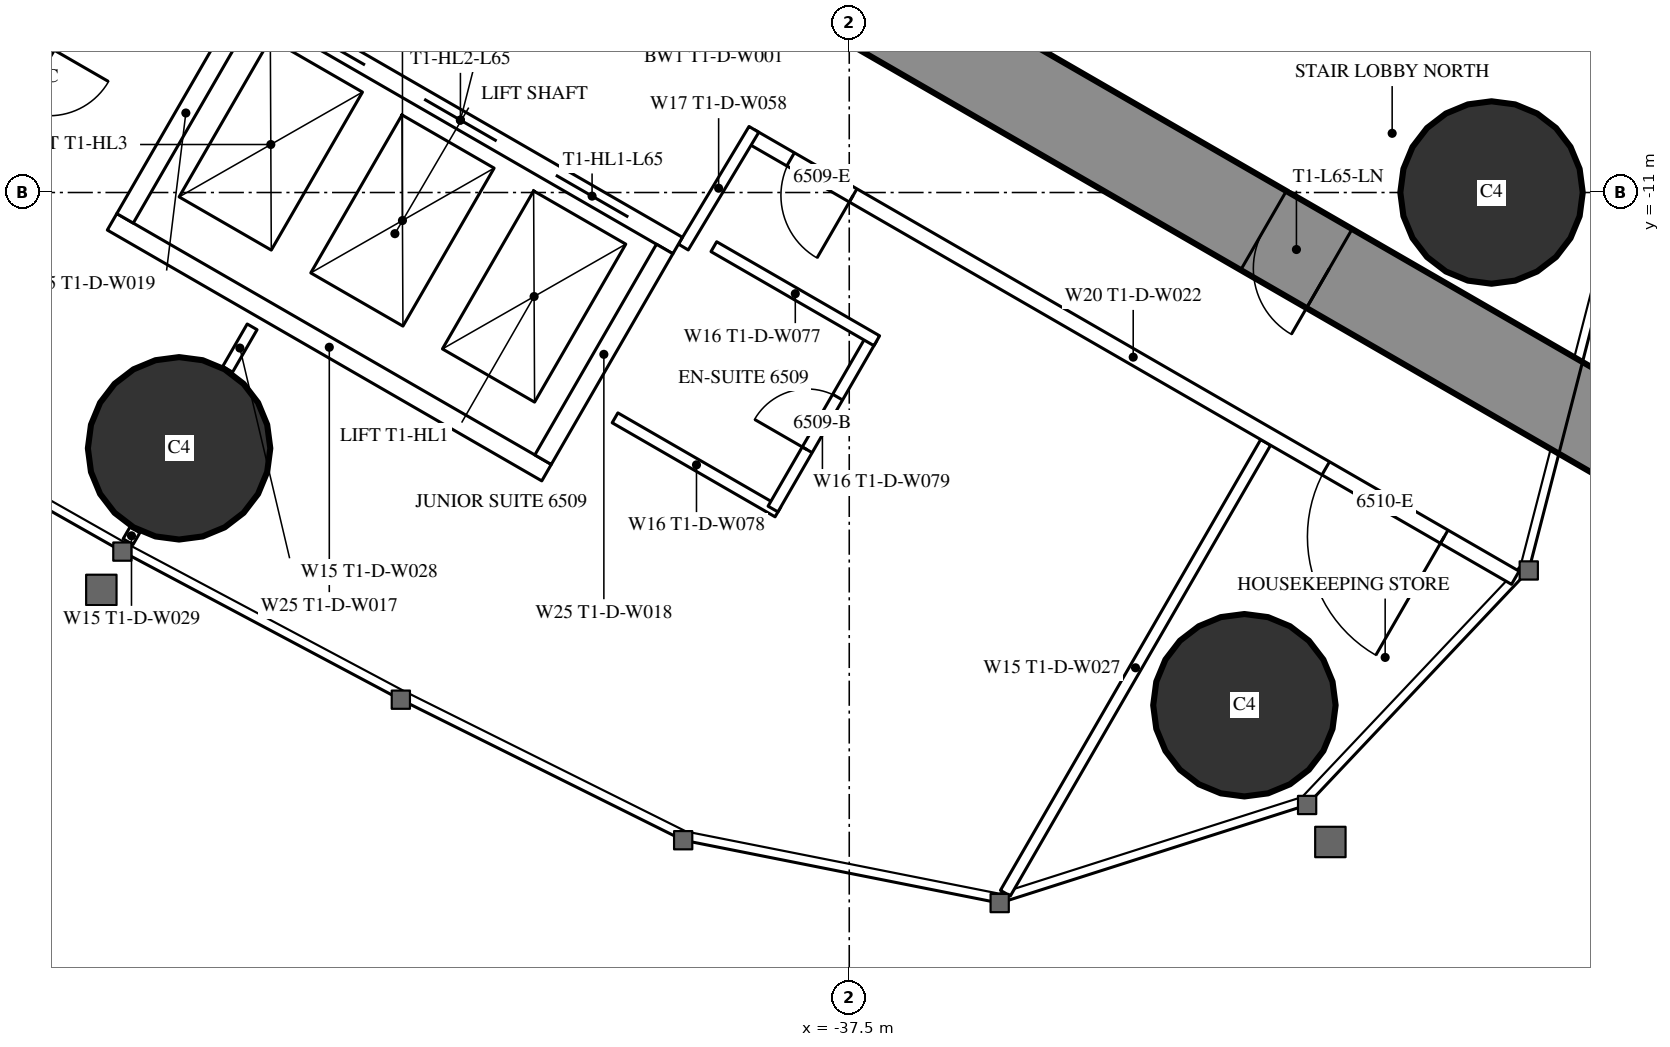
"""IFC4 building model, lengths in metres.
Left out: names, types, materials, properties, quantities, classifications, styles, units other than length and angle.
Written with IfcOpenShell. Run it as: python <this file> out.ifc"""

import sys

from ifc_helpers import new_model, si_unit, direction, frame, frame_2d, origin, origin_2d, place, context, subcontext, project, spatial, rectangle, circle, extrude, element, fill, save


model = new_model("IFC4")
c1 = context("Model", 3, precision=1e-05, world=origin(), true_north=direction((0.0, 1.0)))
c2 = subcontext(c1, "Body", "Model", "MODEL_VIEW")
j1 = project(units=[si_unit("LENGTHUNIT", "METRE"), si_unit("PLANEANGLEUNIT", "RADIAN")], contexts=[c1])
p1 = place(None, origin())
s1 = spatial("IfcSite", under=j1, at=p1, CompositionType="ELEMENT")
p2 = place(p1, origin())
s2 = spatial("IfcBuilding", under=s1, at=p2, CompositionType="ELEMENT")
p3 = place(p2, frame((0.0, 0.0, 244.1)))
s3 = spatial("IfcBuildingStorey", under=s2, at=p3, CompositionType="ELEMENT", Elevation=244.1)
for number, where, z_axis, x_axis in (
    (1, (-32.301, -17.745, 0.0), (0.0, 0.0, 1.0), (1.0, 0.0, 0.0)),
    (2, (-29.05, -11.0, 0.0), (0.0, 0.0, 1.0), (1.0, 0.0, 0.0)),
    (3, (-46.317, -14.365, 0.0), (0.0, 0.0, 1.0), (1.0, 0.0, 0.0)),
):
    element("IfcColumn", number, at=place(p3, frame(where, z_axis=z_axis, x_axis=x_axis)), inside=s3, PredefinedType="COLUMN", context=c2, shape_type="SweptSolid", body=[
        extrude(circle(Radius=1.2, at=origin_2d()), origin(), (0.0, 0.0, 1.0), 3.6),
    ])
p4 = place(p3, frame((-27.2, -14.3, 0.0), z_axis=(0.0, 0.0, 1.0), x_axis=(-0.866024021859, 0.500002393557, 0.0)))
e4 = element("IfcWall", 4, at=p4, inside=s3, PredefinedType="SHEAR", context=c2, shape_type="SweptSolid", body=[
    extrude(rectangle(XDim=27.907, YDim=1.2, at=frame_2d((13.954, 0.0))), origin(), (0.0, 0.0, 1.0), 3.6),
])
p5 = place(p4, frame((4.6, 0.0, 0.0)))
e5 = element("IfcOpeningElement", 5, at=p5, cuts=e4, PredefinedType="OPENING", context=c2, shape_type="SweptSolid", body=[
    extrude(rectangle(XDim=1.0, YDim=2.2, at=frame_2d((0.5, 1.1))), frame((0.0, 0.61, 0.0), z_axis=(0.0, -1.0, 0.0), x_axis=(1.0, 0.0, 0.0)), (0.0, 0.0, 1.0), 1.22),
])
p6 = place(p4, frame((13.395, 0.0, 0.0)))
e6 = element("IfcOpeningElement", 6, at=p6, cuts=e4, PredefinedType="OPENING", context=c2, shape_type="SweptSolid", body=[
    extrude(rectangle(XDim=1.8, YDim=2.2, at=frame_2d((0.9, 1.1))), frame((0.0, 0.61, 0.0), z_axis=(0.0, -1.0, 0.0), x_axis=(1.0, 0.0, 0.0)), (0.0, 0.0, 1.0), 1.22),
])
p7 = place(p3, frame((-32.022, -14.287, 0.0), z_axis=(0.0, 0.0, 1.0), x_axis=(-0.50000019414, -0.866025291697, 0.0)))
e7 = element("IfcWall", 7, at=p7, inside=s3, PredefinedType="PARTITIONING", context=c2, shape_type="SweptSolid", body=[
    extrude(rectangle(XDim=6.848, YDim=0.15, at=frame_2d((3.424, 0.0))), origin(), (0.0, 0.0, 1.0), 3.35),
])
p8 = place(p3, frame((-46.898, -15.439, 0.0), z_axis=(0.0, 0.0, 1.0), x_axis=(-0.500232303069, -0.865891241997, 0.0)))
e8 = element("IfcWall", 8, at=p8, inside=s3, PredefinedType="PARTITIONING", context=c2, shape_type="SweptSolid", body=[
    extrude(rectangle(XDim=0.18, YDim=0.15, at=frame_2d((0.09, 0.0))), origin(), (0.0, 0.0, 1.0), 2.45),
])
p9 = place(p3, frame((-46.274, -6.059, 0.0), z_axis=(0.0, 0.0, 1.0), x_axis=(-0.500020471368, -0.866013584312, 0.0)))
e9 = element("IfcWall", 9, at=p9, inside=s3, PredefinedType="PARTITIONING", context=c2, shape_type="SweptSolid", body=[
    extrude(rectangle(XDim=6.028, YDim=0.15, at=frame_2d((3.014, 0.0))), origin(), (0.0, 0.0, 1.0), 2.45),
])
p10 = place(p9, frame((3.5, 0.0, 0.0)))
e10 = element("IfcOpeningElement", 10, at=p10, cuts=e9, PredefinedType="OPENING", context=c2, shape_type="SweptSolid", body=[
    extrude(rectangle(XDim=0.9, YDim=2.2, at=frame_2d((0.45, 1.1))), frame((0.0, 0.085, 0.0), z_axis=(0.0, -1.0, 0.0), x_axis=(1.0, 0.0, 0.0)), (0.0, 0.0, 1.0), 0.17),
])
p11 = place(p3, frame((-45.356, -12.767, 0.0), z_axis=(0.0, 0.0, 1.0), x_axis=(-0.499886366516, -0.866091000168, 0.0)))
e11 = element("IfcWall", 11, at=p11, inside=s3, PredefinedType="PARTITIONING", context=c2, shape_type="SweptSolid", body=[
    extrude(rectangle(XDim=0.645, YDim=0.15, at=frame_2d((0.322, 0.0))), origin(), (0.0, 0.0, 1.0), 3.35),
])
p12 = place(p3, frame((-28.737, -16.068, 0.0), z_axis=(0.0, 0.0, 1.0), x_axis=(-0.866029399323, 0.49999307946, 0.0)))
e12 = element("IfcWall", 12, at=p12, inside=s3, PredefinedType="PARTITIONING", context=c2, shape_type="SweptSolid", body=[
    extrude(rectangle(XDim=11.61, YDim=0.2, at=frame_2d((5.805, 0.0))), origin(), (0.0, 0.0, 1.0), 3.35),
])
p13 = place(p12, frame((1.08, 0.0, 0.0)))
e13 = element("IfcOpeningElement", 13, at=p13, cuts=e12, PredefinedType="OPENING", context=c2, shape_type="SweptSolid", body=[
    extrude(rectangle(XDim=1.8, YDim=2.04, at=frame_2d((0.9, 1.02))), frame((0.0, 0.11, 0.0), z_axis=(0.0, -1.0, 0.0), x_axis=(1.0, 0.0, 0.0)), (0.0, 0.0, 1.0), 0.22),
])
p14 = place(p12, frame((10.06, 0.0, 0.0)))
e14 = element("IfcOpeningElement", 14, at=p14, cuts=e12, PredefinedType="OPENING", context=c2, shape_type="SweptSolid", body=[
    extrude(rectangle(XDim=0.95, YDim=2.2, at=frame_2d((0.475, 1.1))), frame((0.0, 0.11, 0.0), z_axis=(0.0, -1.0, 0.0), x_axis=(1.0, 0.0, 0.0)), (0.0, 0.0, 1.0), 0.22),
])
p15 = place(p3, frame((-39.683, -11.718, 0.0), z_axis=(0.0, 0.0, 1.0), x_axis=(0.514336634837, 0.857588377991, 0.0)))
e15 = element("IfcWall", 15, at=p15, inside=s3, PredefinedType="PARTITIONING", context=c2, shape_type="SweptSolid", body=[
    extrude(rectangle(XDim=1.805, YDim=0.15, at=frame_2d((0.903, 0.0))), origin(), (0.0, 0.0, 1.0), 3.35),
])
p16 = place(p3, frame((-38.438, -15.202, 0.0), z_axis=(0.0, 0.0, 1.0), x_axis=(-0.866073894602, 0.499916002032, 0.0)))
e16 = element("IfcWall", 16, at=p16, inside=s3, PredefinedType="PARTITIONING", context=c2, shape_type="SweptSolid", body=[
    extrude(rectangle(XDim=2.475, YDim=0.15, at=frame_2d((1.238, 0.0))), origin(), (0.0, 0.0, 1.0), 3.35),
])
p17 = place(p3, frame((-37.203, -12.913, 0.0), z_axis=(0.0, 0.0, 1.0), x_axis=(-0.500006934395, -0.866021400173, 0.0)))
e17 = element("IfcWall", 17, at=p17, inside=s3, PredefinedType="PARTITIONING", context=c2, shape_type="SweptSolid", body=[
    extrude(rectangle(XDim=2.6, YDim=0.15, at=frame_2d((1.3, 0.0))), origin(), (0.0, 0.0, 1.0), 3.35),
])
p18 = place(p17, frame((0.9, 0.0, 0.0)))
e18 = element("IfcOpeningElement", 18, at=p18, cuts=e17, PredefinedType="OPENING", context=c2, shape_type="SweptSolid", body=[
    extrude(rectangle(XDim=0.8, YDim=2.2, at=frame_2d((0.4, 1.1))), frame((0.0, 0.085, 0.0), z_axis=(0.0, -1.0, 0.0), x_axis=(1.0, 0.0, 0.0)), (0.0, 0.0, 1.0), 0.17),
])
p19 = place(p3, frame((-37.138, -12.95, 0.0), z_axis=(0.0, 0.0, 1.0), x_axis=(-0.866031185235, 0.4999899861, 0.0)))
e19 = element("IfcWall", 19, at=p19, inside=s3, PredefinedType="PARTITIONING", context=c2, shape_type="SweptSolid", body=[
    extrude(rectangle(XDim=2.475, YDim=0.15, at=frame_2d((1.238, 0.0))), origin(), (0.0, 0.0, 1.0), 2.5),
])
p20 = place(p3, frame((-39.758, -11.697, 0.0), z_axis=(0.0, 0.0, 1.0), x_axis=(-0.866024194504, 0.500002094529, 0.0)))
e20 = element("IfcWall", 20, at=p20, inside=s3, PredefinedType="PARTITIONING", context=c2, shape_type="SweptSolid", body=[
    extrude(rectangle(XDim=6.6, YDim=0.25, at=frame_2d((3.3, 0.0))), origin(), (0.0, 0.0, 1.0), 3.35),
])
p21 = place(p20, frame((0.75, 0.0, 0.0)))
e21 = element("IfcOpeningElement", 21, at=p21, cuts=e20, PredefinedType="OPENING", context=c2, shape_type="SweptSolid", body=[
    extrude(rectangle(XDim=1.1, YDim=2.2, at=frame_2d((0.55, 1.1))), frame((0.0, 0.135, 0.0), z_axis=(0.0, -1.0, 0.0), x_axis=(1.0, 0.0, 0.0)), (0.0, 0.0, 1.0), 0.27),
])
p22 = place(p20, frame((2.75, 0.0, 0.0)))
e22 = element("IfcOpeningElement", 22, at=p22, cuts=e20, PredefinedType="OPENING", context=c2, shape_type="SweptSolid", body=[
    extrude(rectangle(XDim=1.1, YDim=2.2, at=frame_2d((0.55, 1.1))), frame((0.0, 0.135, 0.0), z_axis=(0.0, -1.0, 0.0), x_axis=(1.0, 0.0, 0.0)), (0.0, 0.0, 1.0), 0.27),
])
p23 = place(p20, frame((4.75, 0.0, 0.0)))
e23 = element("IfcOpeningElement", 23, at=p23, cuts=e20, PredefinedType="OPENING", context=c2, shape_type="SweptSolid", body=[
    extrude(rectangle(XDim=1.1, YDim=2.2, at=frame_2d((0.55, 1.1))), frame((0.0, 0.135, 0.0), z_axis=(0.0, -1.0, 0.0), x_axis=(1.0, 0.0, 0.0)), (0.0, 0.0, 1.0), 0.27),
])
p24 = place(p3, frame((-41.482, -14.686, 0.0), z_axis=(0.0, 0.0, 1.0), x_axis=(-0.86603344179, 0.499986077507, 0.0)))
e24 = element("IfcWall", 24, at=p24, inside=s3, PredefinedType="PARTITIONING", context=c2, shape_type="SweptSolid", body=[
    extrude(rectangle(XDim=6.6, YDim=0.25, at=frame_2d((3.3, 0.0))), origin(), (0.0, 0.0, 1.0), 3.35),
])
for number, where, z_axis, x_axis in (
    (25, (-39.928, -11.743, 0.0), (0.0, 0.0, 1.0), (-0.5, -0.866, 0.0)),
    (26, (-45.428, -8.568, 0.0), (0.0, 0.0, 1.0), (-0.5, -0.866, 0.0)),
):
    element("IfcWall", number, at=place(p3, frame(where, z_axis=z_axis, x_axis=x_axis)), inside=s3, PredefinedType="PARTITIONING", context=c2, shape_type="SweptSolid", body=[
        extrude(rectangle(XDim=3.201, YDim=0.25, at=frame_2d((1.6, 0.0))), origin(), (0.0, 0.0, 1.0), 3.35),
    ])
p25 = place(p13, origin())
e27 = element("IfcDoor", 27, at=p25, inside=s3, OperationType="DOUBLE_DOOR_SINGLE_SWING", PredefinedType="DOOR", context=c2, shape_type="SweptSolid", body=[
    extrude(rectangle(XDim=1.8, YDim=2.04, at=frame_2d((0.9, 1.02))), frame((0.0, 0.025, 0.0), z_axis=(0.0, -1.0, 0.0), x_axis=(1.0, 0.0, 0.0)), (0.0, 0.0, 1.0), 0.05),
])
fill(e13, e27)
p26 = place(p18, origin())
e28 = element("IfcDoor", 28, at=p26, inside=s3, OperationType="SINGLE_SWING_RIGHT", PredefinedType="DOOR", context=c2, shape_type="SweptSolid", body=[
    extrude(rectangle(XDim=0.8, YDim=2.2, at=frame_2d((0.4, 1.1))), frame((0.0, 0.025, 0.0), z_axis=(0.0, -1.0, 0.0), x_axis=(1.0, 0.0, 0.0)), (0.0, 0.0, 1.0), 0.05),
])
fill(e18, e28)
p27 = place(p14, origin())
e29 = element("IfcDoor", 29, at=p27, inside=s3, OperationType="SINGLE_SWING_LEFT", PredefinedType="DOOR", context=c2, shape_type="SweptSolid", body=[
    extrude(rectangle(XDim=0.95, YDim=2.2, at=frame_2d((0.475, 1.1))), frame((0.0, 0.025, 0.0), z_axis=(0.0, -1.0, 0.0), x_axis=(1.0, 0.0, 0.0)), (0.0, 0.0, 1.0), 0.05),
])
fill(e14, e29)
p28 = place(p5, origin())
e30 = element("IfcDoor", 30, at=p28, inside=s3, OperationType="SINGLE_SWING_LEFT", PredefinedType="DOOR", context=c2, shape_type="SweptSolid", body=[
    extrude(rectangle(XDim=1.0, YDim=2.2, at=frame_2d((0.5, 1.1))), frame((0.0, 0.025, 0.0), z_axis=(0.0, -1.0, 0.0), x_axis=(1.0, 0.0, 0.0)), (0.0, 0.0, 1.0), 0.05),
])
fill(e5, e30)
p29 = place(p21, origin())
e31 = element("IfcDoor", 31, at=p29, inside=s3, OperationType="DOUBLE_DOOR_SLIDING", PredefinedType="USERDEFINED", context=c2, shape_type="SweptSolid", body=[
    extrude(rectangle(XDim=1.1, YDim=2.2, at=frame_2d((0.55, 1.1))), frame((0.0, 0.025, 0.0), z_axis=(0.0, -1.0, 0.0), x_axis=(1.0, 0.0, 0.0)), (0.0, 0.0, 1.0), 0.05),
])
fill(e21, e31)
p30 = place(p22, origin())
e32 = element("IfcDoor", 32, at=p30, inside=s3, OperationType="DOUBLE_DOOR_SLIDING", PredefinedType="USERDEFINED", context=c2, shape_type="SweptSolid", body=[
    extrude(rectangle(XDim=1.1, YDim=2.2, at=frame_2d((0.55, 1.1))), frame((0.0, 0.025, 0.0), z_axis=(0.0, -1.0, 0.0), x_axis=(1.0, 0.0, 0.0)), (0.0, 0.0, 1.0), 0.05),
])
fill(e22, e32)
p31 = place(p23, origin())
e33 = element("IfcDoor", 33, at=p31, inside=s3, OperationType="DOUBLE_DOOR_SLIDING", PredefinedType="USERDEFINED", context=c2, shape_type="SweptSolid", body=[
    extrude(rectangle(XDim=1.1, YDim=2.2, at=frame_2d((0.55, 1.1))), frame((0.0, 0.025, 0.0), z_axis=(0.0, -1.0, 0.0), x_axis=(1.0, 0.0, 0.0)), (0.0, 0.0, 1.0), 0.05),
])
fill(e23, e33)
save(model, sys.argv[1])
